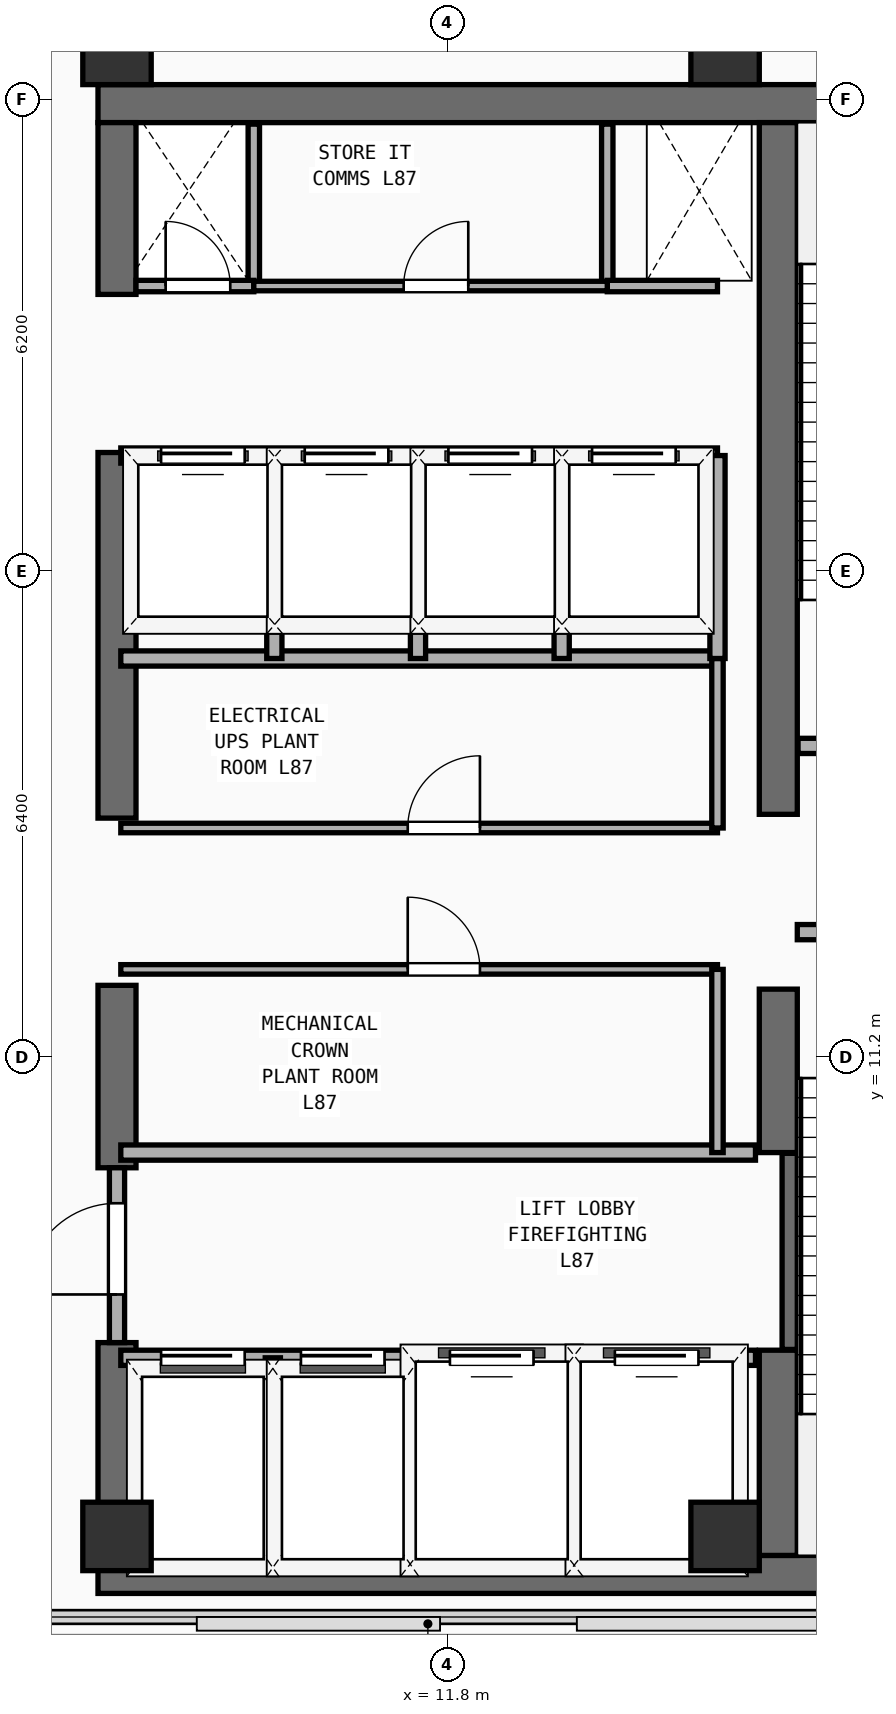
"""IFC4 building model, lengths in metres.
Left out: names, types, materials, properties, quantities, classifications, styles, units other than length and angle.
Written with IfcOpenShell. Run it as: python <this file> out.ifc"""

import sys

from ifc_helpers import new_model, si_unit, direction, frame, frame_2d, origin, origin_2d, place, context, subcontext, project, spatial, rectangle, extrude, element, fill, save


model = new_model("IFC4")
c1 = context("Model", 3, precision=1e-05, world=origin(), true_north=direction((0.0, 1.0)))
c2 = subcontext(c1, "Body", "Model", "MODEL_VIEW")
j1 = project(units=[si_unit("LENGTHUNIT", "METRE"), si_unit("PLANEANGLEUNIT", "RADIAN")], contexts=[c1])
p1 = place(None, origin())
s1 = spatial("IfcSite", under=j1, at=p1, CompositionType="ELEMENT")
p2 = place(p1, origin())
s2 = spatial("IfcBuilding", under=s1, at=p2, CompositionType="ELEMENT")
p3 = place(p2, frame((0.0, 0.0, 338.8)))
s3 = spatial("IfcBuildingStorey", under=s2, at=p3, CompositionType="ELEMENT", Elevation=338.8)
for number, where, z_axis, x_axis in (
    (1, (7.2, 4.4, 0.0), (0.0, 0.0, 1.0), (1.0, 0.0, 0.0)),
    (2, (7.2, 23.75, 0.0), (0.0, 0.0, 1.0), (1.0, 0.0, 0.0)),
):
    element("IfcWall", number, at=place(p3, frame(where, z_axis=z_axis, x_axis=x_axis)), inside=s3, PredefinedType="SHEAR", context=c2, shape_type="SweptSolid", body=[
        extrude(rectangle(XDim=13.85, YDim=0.5, at=frame_2d((6.925, 0.0))), origin(), (0.0, 0.0, 1.0), 5.02),
    ])
p4 = place(p3, frame((7.45, 4.65, 0.0), z_axis=(0.0, 0.0, 1.0), x_axis=(0.0, 1.0, 0.0)))
e3 = element("IfcWall", 3, at=p4, inside=s3, PredefinedType="SHEAR", context=c2, shape_type="SweptSolid", body=[
    extrude(rectangle(XDim=2.8, YDim=0.5, at=frame_2d((1.4, 0.0))), origin(), (0.0, 0.0, 1.0), 5.02),
])
p5 = place(p3, frame((7.45, 9.75, 0.0), z_axis=(0.0, 0.0, 1.0), x_axis=(0.0, 1.0, 0.0)))
e4 = element("IfcWall", 4, at=p5, inside=s3, PredefinedType="SHEAR", context=c2, shape_type="SweptSolid", body=[
    extrude(rectangle(XDim=2.4, YDim=0.5, at=frame_2d((1.2, 0.0))), origin(), (0.0, 0.0, 1.0), 5.02),
])
p6 = place(p3, frame((7.45, 14.35, 0.0), z_axis=(0.0, 0.0, 1.0), x_axis=(0.0, 1.0, 0.0)))
e5 = element("IfcWall", 5, at=p6, inside=s3, PredefinedType="SHEAR", context=c2, shape_type="SweptSolid", body=[
    extrude(rectangle(XDim=4.81, YDim=0.5, at=frame_2d((2.405, 0.0))), origin(), (0.0, 0.0, 1.0), 5.02),
])
p7 = place(p3, frame((7.45, 21.24, 0.0), z_axis=(0.0, 0.0, 1.0), x_axis=(0.0, 1.0, 0.0)))
e6 = element("IfcWall", 6, at=p7, inside=s3, PredefinedType="SHEAR", context=c2, shape_type="SweptSolid", body=[
    extrude(rectangle(XDim=2.26, YDim=0.5, at=frame_2d((1.13, 0.0))), origin(), (0.0, 0.0, 1.0), 5.02),
])
p8 = place(p3, frame((16.15, 4.65, 0.0), z_axis=(0.0, 0.0, 1.0), x_axis=(0.0, 1.0, 0.0)))
e7 = element("IfcWall", 7, at=p8, inside=s3, PredefinedType="SHEAR", context=c2, shape_type="SweptSolid", body=[
    extrude(rectangle(XDim=2.7, YDim=0.5, at=frame_2d((1.35, 0.0))), origin(), (0.0, 0.0, 1.0), 5.02),
])
p9 = place(p3, frame((16.15, 9.95, 0.0), z_axis=(0.0, 0.0, 1.0), x_axis=(0.0, 1.0, 0.0)))
e8 = element("IfcWall", 8, at=p9, inside=s3, PredefinedType="SHEAR", context=c2, shape_type="SweptSolid", body=[
    extrude(rectangle(XDim=2.15, YDim=0.5, at=frame_2d((1.075, 0.0))), origin(), (0.0, 0.0, 1.0), 5.02),
])
p10 = place(p3, frame((16.15, 14.4, 0.0), z_axis=(0.0, 0.0, 1.0), x_axis=(0.0, 1.0, 0.0)))
e9 = element("IfcWall", 9, at=p10, inside=s3, PredefinedType="SHEAR", context=c2, shape_type="SweptSolid", body=[
    extrude(rectangle(XDim=9.1, YDim=0.5, at=frame_2d((4.55, 0.0))), origin(), (0.0, 0.0, 1.0), 5.02),
])
for number, where, z_axis, x_axis in (
    (10, (7.45, 4.9, 0.0), (0.0, 0.0, 1.0), (1.0, 0.0, 0.0)),
    (11, (15.45, 4.9, 0.0), (0.0, 0.0, 1.0), (1.0, 0.0, 0.0)),
    (12, (7.45, 24.45, 0.0), (0.0, 0.0, 1.0), (1.0, 0.0, 0.0)),
    (13, (15.45, 24.45, 0.0), (0.0, 0.0, 1.0), (1.0, 0.0, 0.0)),
):
    element("IfcColumn", number, at=place(p3, frame(where, z_axis=z_axis, x_axis=x_axis)), inside=s3, PredefinedType="COLUMN", context=c2, shape_type="SweptSolid", body=[
        extrude(rectangle(XDim=0.9, YDim=0.9, at=origin_2d()), origin(), (0.0, 0.0, 1.0), 5.02),
    ])
p11 = place(p3, frame((16.3, 7.36, 0.0), z_axis=(0.0, 0.0, 1.0), x_axis=(0.0, 1.0, 0.0)))
e14 = element("IfcWall", 14, at=p11, inside=s3, PredefinedType="SHEAR", context=c2, shape_type="SweptSolid", body=[
    extrude(rectangle(XDim=2.58, YDim=0.2, at=frame_2d((1.29, 0.0))), origin(), (0.0, 0.0, 1.0), 5.02),
])
p12 = place(p3, frame((16.4, 12.85, 0.0), z_axis=(0.0, 0.0, 1.0), x_axis=(1.0, 0.0, 0.0)))
e15 = element("IfcWall", 15, at=p12, inside=s3, PredefinedType="PARTITIONING", context=c2, shape_type="SweptSolid", body=[
    extrude(rectangle(XDim=3.96, YDim=0.2, at=frame_2d((1.98, 0.0))), origin(), (0.0, 0.0, 1.0), 5.02),
])
p13 = place(p12, frame((1.304, 0.0, 0.0)))
e16 = element("IfcOpeningElement", 16, at=p13, cuts=e15, PredefinedType="OPENING", context=c2, shape_type="SweptSolid", body=[
    extrude(rectangle(XDim=1.1, YDim=2.2, at=frame_2d((0.55, 1.1))), frame((0.0, 0.11, 0.0), z_axis=(0.0, -1.0, 0.0), x_axis=(1.0, 0.0, 0.0)), (0.0, 0.0, 1.0), 0.22),
])
p14 = place(p3, frame((16.41, 15.3, 0.0), z_axis=(0.0, 0.0, 1.0), x_axis=(1.0, 0.0, 0.0)))
e17 = element("IfcWall", 17, at=p14, inside=s3, PredefinedType="PARTITIONING", context=c2, shape_type="SweptSolid", body=[
    extrude(rectangle(XDim=3.95, YDim=0.2, at=frame_2d((1.975, 0.0))), origin(), (0.0, 0.0, 1.0), 5.02),
])
p15 = place(p14, frame((1.294, 0.0, 0.0)))
e18 = element("IfcOpeningElement", 18, at=p15, cuts=e17, PredefinedType="OPENING", context=c2, shape_type="SweptSolid", body=[
    extrude(rectangle(XDim=1.1, YDim=2.2, at=frame_2d((0.55, 1.1))), frame((0.0, 0.11, 0.0), z_axis=(0.0, -1.0, 0.0), x_axis=(1.0, 0.0, 0.0)), (0.0, 0.0, 1.0), 0.22),
])
p16 = place(p3, frame((7.5, 7.25, 0.0), z_axis=(0.0, 0.0, 1.0), x_axis=(1.0, 0.0, 0.0)))
e19 = element("IfcWall", 19, at=p16, inside=s3, PredefinedType="PARTITIONING", context=c2, shape_type="SweptSolid", body=[
    extrude(rectangle(XDim=8.35, YDim=0.2, at=frame_2d((4.175, 0.0))), origin(), (0.0, 0.0, 1.0), 5.02),
])
p17 = place(p16, frame((0.53, 0.0, 0.0)))
e20 = element("IfcOpeningElement", 20, at=p17, cuts=e19, PredefinedType="OPENING", context=c2, shape_type="SweptSolid", body=[
    extrude(rectangle(XDim=1.1, YDim=2.2, at=frame_2d((0.55, 1.1))), frame((0.0, 0.11, 0.0), z_axis=(0.0, -1.0, 0.0), x_axis=(1.0, 0.0, 0.0)), (0.0, 0.0, 1.0), 0.22),
])
p18 = place(p16, frame((2.37, 0.0, 0.0)))
e21 = element("IfcOpeningElement", 21, at=p18, cuts=e19, PredefinedType="OPENING", context=c2, shape_type="SweptSolid", body=[
    extrude(rectangle(XDim=1.1, YDim=2.2, at=frame_2d((0.55, 1.1))), frame((0.0, 0.11, 0.0), z_axis=(0.0, -1.0, 0.0), x_axis=(1.0, 0.0, 0.0)), (0.0, 0.0, 1.0), 0.22),
])
p19 = place(p16, frame((4.33, 0.0, 0.0)))
e22 = element("IfcOpeningElement", 22, at=p19, cuts=e19, PredefinedType="OPENING", context=c2, shape_type="SweptSolid", body=[
    extrude(rectangle(XDim=1.1, YDim=2.2, at=frame_2d((0.55, 1.1))), frame((0.0, 0.11, 0.0), z_axis=(0.0, -1.0, 0.0), x_axis=(1.0, 0.0, 0.0)), (0.0, 0.0, 1.0), 0.22),
])
p20 = place(p16, frame((6.5, 0.0, 0.0)))
e23 = element("IfcOpeningElement", 23, at=p20, cuts=e19, PredefinedType="OPENING", context=c2, shape_type="SweptSolid", body=[
    extrude(rectangle(XDim=1.1, YDim=2.2, at=frame_2d((0.55, 1.1))), frame((0.0, 0.11, 0.0), z_axis=(0.0, -1.0, 0.0), x_axis=(1.0, 0.0, 0.0)), (0.0, 0.0, 1.0), 0.22),
])
p21 = place(p3, frame((7.5, 9.95, 0.0), z_axis=(0.0, 0.0, 1.0), x_axis=(1.0, 0.0, 0.0)))
e24 = element("IfcWall", 24, at=p21, inside=s3, PredefinedType="PARTITIONING", context=c2, shape_type="SweptSolid", body=[
    extrude(rectangle(XDim=8.35, YDim=0.2, at=frame_2d((4.175, 0.0))), origin(), (0.0, 0.0, 1.0), 5.02),
])
for number, where, z_axis, x_axis in (
    (25, (9.5, 4.45, 0.0), (0.0, 0.0, 1.0), (0.0, 1.0, 0.0)),
    (26, (11.36, 4.45, 0.0), (0.0, 0.0, 1.0), (0.0, 1.0, 0.0)),
    (27, (13.46, 4.45, 0.0), (0.0, 0.0, 1.0), (0.0, 1.0, 0.0)),
):
    element("IfcWall", number, at=place(p3, frame(where, z_axis=z_axis, x_axis=x_axis)), inside=s3, PredefinedType="PARTITIONING", context=c2, shape_type="SweptSolid", body=[
        extrude(rectangle(XDim=2.8, YDim=0.2, at=frame_2d((1.4, 0.0))), origin(), (0.0, 0.0, 1.0), 5.02),
    ])
p22 = place(p3, frame((7.45, 7.45, 0.0), z_axis=(0.0, 0.0, 1.0), x_axis=(0.0, 1.0, 0.0)))
e28 = element("IfcWall", 28, at=p22, inside=s3, PredefinedType="PARTITIONING", context=c2, shape_type="SweptSolid", body=[
    extrude(rectangle(XDim=2.3, YDim=0.2, at=frame_2d((1.15, 0.0))), origin(), (0.0, 0.0, 1.0), 4.0),
])
p23 = place(p22, frame((0.633, 0.0, 0.0)))
e29 = element("IfcOpeningElement", 29, at=p23, cuts=e28, PredefinedType="OPENING", context=c2, shape_type="SweptSolid", body=[
    extrude(rectangle(XDim=1.2, YDim=2.25, at=frame_2d((0.6, 1.125))), frame((0.0, 0.11, 0.0), z_axis=(0.0, -1.0, 0.0), x_axis=(1.0, 0.0, 0.0)), (0.0, 0.0, 1.0), 0.22),
])
p24 = place(p3, frame((7.5, 16.45, 0.0), z_axis=(0.0, 0.0, 1.0), x_axis=(1.0, 0.0, 0.0)))
e30 = element("IfcWall", 30, at=p24, inside=s3, PredefinedType="PARTITIONING", context=c2, shape_type="SweptSolid", body=[
    extrude(rectangle(XDim=7.85, YDim=0.2, at=frame_2d((3.925, 0.0))), origin(), (0.0, 0.0, 1.0), 5.02),
])
p25 = place(p3, frame((7.5, 12.36, 0.0), z_axis=(0.0, 0.0, 1.0), x_axis=(1.0, 0.0, 0.0)))
e31 = element("IfcWall", 31, at=p25, inside=s3, PredefinedType="PARTITIONING", context=c2, shape_type="SweptSolid", body=[
    extrude(rectangle(XDim=7.85, YDim=0.125, at=frame_2d((3.925, 0.0))), origin(), (0.0, 0.0, 1.0), 5.02),
])
p26 = place(p25, frame((3.775, 0.0, 0.0)))
e32 = element("IfcOpeningElement", 32, at=p26, cuts=e31, PredefinedType="OPENING", context=c2, shape_type="SweptSolid", body=[
    extrude(rectangle(XDim=0.95, YDim=2.15, at=frame_2d((0.475, 1.075))), frame((0.0, 0.073, 0.0), z_axis=(0.0, -1.0, 0.0), x_axis=(1.0, 0.0, 0.0)), (0.0, 0.0, 1.0), 0.145),
])
p27 = place(p3, frame((7.5, 14.22, 0.0), z_axis=(0.0, 0.0, 1.0), x_axis=(1.0, 0.0, 0.0)))
e33 = element("IfcWall", 33, at=p27, inside=s3, PredefinedType="PARTITIONING", context=c2, shape_type="SweptSolid", body=[
    extrude(rectangle(XDim=7.85, YDim=0.125, at=frame_2d((3.925, 0.0))), origin(), (0.0, 0.0, 1.0), 5.02),
])
p28 = place(p27, frame((3.775, 0.0, 0.0)))
e34 = element("IfcOpeningElement", 34, at=p28, cuts=e33, PredefinedType="OPENING", context=c2, shape_type="SweptSolid", body=[
    extrude(rectangle(XDim=0.95, YDim=2.15, at=frame_2d((0.475, 1.075))), frame((0.0, 0.073, 0.0), z_axis=(0.0, -1.0, 0.0), x_axis=(1.0, 0.0, 0.0)), (0.0, 0.0, 1.0), 0.145),
])
p29 = place(p3, frame((15.35, 9.95, 0.0), z_axis=(0.0, 0.0, 1.0), x_axis=(0.0, 1.0, 0.0)))
e35 = element("IfcWall", 35, at=p29, inside=s3, PredefinedType="PARTITIONING", context=c2, shape_type="SweptSolid", body=[
    extrude(rectangle(XDim=2.41, YDim=0.15, at=frame_2d((1.205, 0.0))), origin(), (0.0, 0.0, 1.0), 5.02),
])
p30 = place(p3, frame((15.35, 14.22, 0.0), z_axis=(0.0, 0.0, 1.0), x_axis=(0.0, 1.0, 0.0)))
e36 = element("IfcWall", 36, at=p30, inside=s3, PredefinedType="PARTITIONING", context=c2, shape_type="SweptSolid", body=[
    extrude(rectangle(XDim=2.23, YDim=0.15, at=frame_2d((1.115, 0.0))), origin(), (0.0, 0.0, 1.0), 5.02),
])
p31 = place(p3, frame((7.5, 19.12, 0.0), z_axis=(0.0, 0.0, 1.0), x_axis=(1.0, 0.0, 0.0)))
e37 = element("IfcWall", 37, at=p31, inside=s3, PredefinedType="PARTITIONING", context=c2, shape_type="SweptSolid", body=[
    extrude(rectangle(XDim=7.85, YDim=0.2, at=frame_2d((3.925, 0.0))), origin(), (0.0, 0.0, 1.0), 5.02),
])
p32 = place(p31, frame((0.53, 0.0, 0.0)))
e38 = element("IfcOpeningElement", 38, at=p32, cuts=e37, PredefinedType="OPENING", context=c2, shape_type="SweptSolid", body=[
    extrude(rectangle(XDim=1.1, YDim=2.2, at=frame_2d((0.55, 1.1))), frame((0.0, 0.11, 0.0), z_axis=(0.0, -1.0, 0.0), x_axis=(1.0, 0.0, 0.0)), (0.0, 0.0, 1.0), 0.22),
])
p33 = place(p31, frame((2.42, 0.0, 0.0)))
e39 = element("IfcOpeningElement", 39, at=p33, cuts=e37, PredefinedType="OPENING", context=c2, shape_type="SweptSolid", body=[
    extrude(rectangle(XDim=1.1, YDim=2.2, at=frame_2d((0.55, 1.1))), frame((0.0, 0.11, 0.0), z_axis=(0.0, -1.0, 0.0), x_axis=(1.0, 0.0, 0.0)), (0.0, 0.0, 1.0), 0.22),
])
p34 = place(p31, frame((4.31, 0.0, 0.0)))
e40 = element("IfcOpeningElement", 40, at=p34, cuts=e37, PredefinedType="OPENING", context=c2, shape_type="SweptSolid", body=[
    extrude(rectangle(XDim=1.1, YDim=2.2, at=frame_2d((0.55, 1.1))), frame((0.0, 0.11, 0.0), z_axis=(0.0, -1.0, 0.0), x_axis=(1.0, 0.0, 0.0)), (0.0, 0.0, 1.0), 0.22),
])
p35 = place(p31, frame((6.2, 0.0, 0.0)))
e41 = element("IfcOpeningElement", 41, at=p35, cuts=e37, PredefinedType="OPENING", context=c2, shape_type="SweptSolid", body=[
    extrude(rectangle(XDim=1.1, YDim=2.2, at=frame_2d((0.55, 1.1))), frame((0.0, 0.11, 0.0), z_axis=(0.0, -1.0, 0.0), x_axis=(1.0, 0.0, 0.0)), (0.0, 0.0, 1.0), 0.22),
])
for number, where, z_axis, x_axis in (
    (42, (15.35, 16.45, 0.0), (0.0, 0.0, 1.0), (0.0, 1.0, 0.0)),
    (43, (9.52, 16.45, 0.0), (0.0, 0.0, 1.0), (0.0, 1.0, 0.0)),
    (44, (11.41, 16.45, 0.0), (0.0, 0.0, 1.0), (0.0, 1.0, 0.0)),
    (45, (13.3, 16.45, 0.0), (0.0, 0.0, 1.0), (0.0, 1.0, 0.0)),
):
    element("IfcWall", number, at=place(p3, frame(where, z_axis=z_axis, x_axis=x_axis)), inside=s3, PredefinedType="PARTITIONING", context=c2, shape_type="SweptSolid", body=[
        extrude(rectangle(XDim=2.67, YDim=0.2, at=frame_2d((1.335, 0.0))), origin(), (0.0, 0.0, 1.0), 5.02),
    ])
for number, where, z_axis, x_axis in (
    (46, (9.25, 21.35, 0.0), (0.0, 0.0, 1.0), (0.0, 1.0, 0.0)),
    (47, (13.9, 21.35, 0.0), (0.0, 0.0, 1.0), (0.0, 1.0, 0.0)),
):
    element("IfcWall", number, at=place(p3, frame(where, z_axis=z_axis, x_axis=x_axis)), inside=s3, PredefinedType="PARTITIONING", context=c2, shape_type="SweptSolid", body=[
        extrude(rectangle(XDim=2.13, YDim=0.15, at=frame_2d((1.065, 0.0))), origin(), (0.0, 0.0, 1.0), 5.02),
    ])
p36 = place(p3, frame((7.7, 21.35, 0.0), z_axis=(0.0, 0.0, 1.0), x_axis=(1.0, 0.0, 0.0)))
e48 = element("IfcWall", 48, at=p36, inside=s3, PredefinedType="PARTITIONING", context=c2, shape_type="SweptSolid", body=[
    extrude(rectangle(XDim=1.55, YDim=0.15, at=frame_2d((0.775, 0.0))), origin(), (0.0, 0.0, 1.0), 5.02),
])
p37 = place(p36, frame((0.39, 0.0, 0.0)))
e49 = element("IfcOpeningElement", 49, at=p37, cuts=e48, PredefinedType="OPENING", context=c2, shape_type="SweptSolid", body=[
    extrude(rectangle(XDim=0.85, YDim=2.15, at=frame_2d((0.425, 1.075))), frame((0.0, 0.085, 0.0), z_axis=(0.0, -1.0, 0.0), x_axis=(1.0, 0.0, 0.0)), (0.0, 0.0, 1.0), 0.17),
])
p38 = place(p3, frame((13.9, 21.35, 0.0), z_axis=(0.0, 0.0, 1.0), x_axis=(1.0, 0.0, 0.0)))
e50 = element("IfcWall", 50, at=p38, inside=s3, PredefinedType="PARTITIONING", context=c2, shape_type="SweptSolid", body=[
    extrude(rectangle(XDim=1.45, YDim=0.15, at=frame_2d((0.725, 0.0))), origin(), (0.0, 0.0, 1.0), 5.02),
])
p39 = place(p3, frame((9.25, 21.35, 0.0), z_axis=(0.0, 0.0, 1.0), x_axis=(1.0, 0.0, 0.0)))
e51 = element("IfcWall", 51, at=p39, inside=s3, PredefinedType="PARTITIONING", context=c2, shape_type="SweptSolid", body=[
    extrude(rectangle(XDim=4.65, YDim=0.125, at=frame_2d((2.325, 0.0))), origin(), (0.0, 0.0, 1.0), 5.02),
])
p40 = place(p39, frame((1.971, 0.0, 0.0)))
e52 = element("IfcOpeningElement", 52, at=p40, cuts=e51, PredefinedType="OPENING", context=c2, shape_type="SweptSolid", body=[
    extrude(rectangle(XDim=0.85, YDim=2.15, at=frame_2d((0.425, 1.075))), frame((0.0, 0.073, 0.0), z_axis=(0.0, -1.0, 0.0), x_axis=(1.0, 0.0, 0.0)), (0.0, 0.0, 1.0), 0.145),
])
p41 = place(p17, origin())
e53 = element("IfcDoor", 53, at=p41, inside=s3, OperationType="SLIDING_TO_LEFT", PredefinedType="DOOR", context=c2, shape_type="SweptSolid", body=[
    extrude(rectangle(XDim=1.1, YDim=2.2, at=frame_2d((0.55, 1.1))), frame((0.0, 0.025, 0.0), z_axis=(0.0, -1.0, 0.0), x_axis=(1.0, 0.0, 0.0)), (0.0, 0.0, 1.0), 0.05),
])
fill(e20, e53)
p42 = place(p18, origin())
e54 = element("IfcDoor", 54, at=p42, inside=s3, OperationType="SLIDING_TO_LEFT", PredefinedType="DOOR", context=c2, shape_type="SweptSolid", body=[
    extrude(rectangle(XDim=1.1, YDim=2.2, at=frame_2d((0.55, 1.1))), frame((0.0, 0.025, 0.0), z_axis=(0.0, -1.0, 0.0), x_axis=(1.0, 0.0, 0.0)), (0.0, 0.0, 1.0), 0.05),
])
fill(e21, e54)
p43 = place(p19, origin())
e55 = element("IfcDoor", 55, at=p43, inside=s3, OperationType="SLIDING_TO_LEFT", PredefinedType="DOOR", context=c2, shape_type="SweptSolid", body=[
    extrude(rectangle(XDim=1.1, YDim=2.2, at=frame_2d((0.55, 1.1))), frame((0.0, 0.025, 0.0), z_axis=(0.0, -1.0, 0.0), x_axis=(1.0, 0.0, 0.0)), (0.0, 0.0, 1.0), 0.05),
])
fill(e22, e55)
p44 = place(p20, origin())
e56 = element("IfcDoor", 56, at=p44, inside=s3, OperationType="SLIDING_TO_LEFT", PredefinedType="DOOR", context=c2, shape_type="SweptSolid", body=[
    extrude(rectangle(XDim=1.1, YDim=2.2, at=frame_2d((0.55, 1.1))), frame((0.0, 0.025, 0.0), z_axis=(0.0, -1.0, 0.0), x_axis=(1.0, 0.0, 0.0)), (0.0, 0.0, 1.0), 0.05),
])
fill(e23, e56)
p45 = place(p23, frame((1.2, 0.0, 0.0), z_axis=(0.0, 0.0, 1.0), x_axis=(-1.0, 0.0, 0.0)))
e57 = element("IfcDoor", 57, at=p45, inside=s3, OperationType="SINGLE_SWING_RIGHT", PredefinedType="DOOR", context=c2, shape_type="SweptSolid", body=[
    extrude(rectangle(XDim=1.2, YDim=2.25, at=frame_2d((0.6, 1.125))), frame((0.0, 0.025, 0.0), z_axis=(0.0, -1.0, 0.0), x_axis=(1.0, 0.0, 0.0)), (0.0, 0.0, 1.0), 0.05),
])
fill(e29, e57)
p46 = place(p26, origin())
e58 = element("IfcDoor", 58, at=p46, inside=s3, OperationType="SINGLE_SWING_LEFT", PredefinedType="DOOR", context=c2, shape_type="SweptSolid", body=[
    extrude(rectangle(XDim=0.95, YDim=2.15, at=frame_2d((0.475, 1.075))), frame((0.0, 0.025, 0.0), z_axis=(0.0, -1.0, 0.0), x_axis=(1.0, 0.0, 0.0)), (0.0, 0.0, 1.0), 0.05),
])
fill(e32, e58)
p47 = place(p28, origin())
e59 = element("IfcDoor", 59, at=p47, inside=s3, OperationType="SINGLE_SWING_RIGHT", PredefinedType="DOOR", context=c2, shape_type="SweptSolid", body=[
    extrude(rectangle(XDim=0.95, YDim=2.15, at=frame_2d((0.475, 1.075))), frame((0.0, 0.025, 0.0), z_axis=(0.0, -1.0, 0.0), x_axis=(1.0, 0.0, 0.0)), (0.0, 0.0, 1.0), 0.05),
])
fill(e34, e59)
p48 = place(p32, origin())
e60 = element("IfcDoor", 60, at=p48, inside=s3, OperationType="SLIDING_TO_LEFT", PredefinedType="DOOR", context=c2, shape_type="SweptSolid", body=[
    extrude(rectangle(XDim=1.1, YDim=2.2, at=frame_2d((0.55, 1.1))), frame((0.0, 0.025, 0.0), z_axis=(0.0, -1.0, 0.0), x_axis=(1.0, 0.0, 0.0)), (0.0, 0.0, 1.0), 0.05),
])
fill(e38, e60)
p49 = place(p33, origin())
e61 = element("IfcDoor", 61, at=p49, inside=s3, OperationType="SLIDING_TO_LEFT", PredefinedType="DOOR", context=c2, shape_type="SweptSolid", body=[
    extrude(rectangle(XDim=1.1, YDim=2.2, at=frame_2d((0.55, 1.1))), frame((0.0, 0.025, 0.0), z_axis=(0.0, -1.0, 0.0), x_axis=(1.0, 0.0, 0.0)), (0.0, 0.0, 1.0), 0.05),
])
fill(e39, e61)
p50 = place(p34, origin())
e62 = element("IfcDoor", 62, at=p50, inside=s3, OperationType="SLIDING_TO_LEFT", PredefinedType="DOOR", context=c2, shape_type="SweptSolid", body=[
    extrude(rectangle(XDim=1.1, YDim=2.2, at=frame_2d((0.55, 1.1))), frame((0.0, 0.025, 0.0), z_axis=(0.0, -1.0, 0.0), x_axis=(1.0, 0.0, 0.0)), (0.0, 0.0, 1.0), 0.05),
])
fill(e40, e62)
p51 = place(p35, origin())
e63 = element("IfcDoor", 63, at=p51, inside=s3, OperationType="SLIDING_TO_LEFT", PredefinedType="DOOR", context=c2, shape_type="SweptSolid", body=[
    extrude(rectangle(XDim=1.1, YDim=2.2, at=frame_2d((0.55, 1.1))), frame((0.0, 0.025, 0.0), z_axis=(0.0, -1.0, 0.0), x_axis=(1.0, 0.0, 0.0)), (0.0, 0.0, 1.0), 0.05),
])
fill(e41, e63)
p52 = place(p37, origin())
e64 = element("IfcDoor", 64, at=p52, inside=s3, OperationType="SINGLE_SWING_LEFT", PredefinedType="DOOR", context=c2, shape_type="SweptSolid", body=[
    extrude(rectangle(XDim=0.85, YDim=2.15, at=frame_2d((0.425, 1.075))), frame((0.0, 0.025, 0.0), z_axis=(0.0, -1.0, 0.0), x_axis=(1.0, 0.0, 0.0)), (0.0, 0.0, 1.0), 0.05),
])
fill(e49, e64)
p53 = place(p40, origin())
e65 = element("IfcDoor", 65, at=p53, inside=s3, OperationType="SINGLE_SWING_RIGHT", PredefinedType="DOOR", context=c2, shape_type="SweptSolid", body=[
    extrude(rectangle(XDim=0.85, YDim=2.15, at=frame_2d((0.425, 1.075))), frame((0.0, 0.025, 0.0), z_axis=(0.0, -1.0, 0.0), x_axis=(1.0, 0.0, 0.0)), (0.0, 0.0, 1.0), 0.05),
])
fill(e52, e65)
save(model, sys.argv[1])
